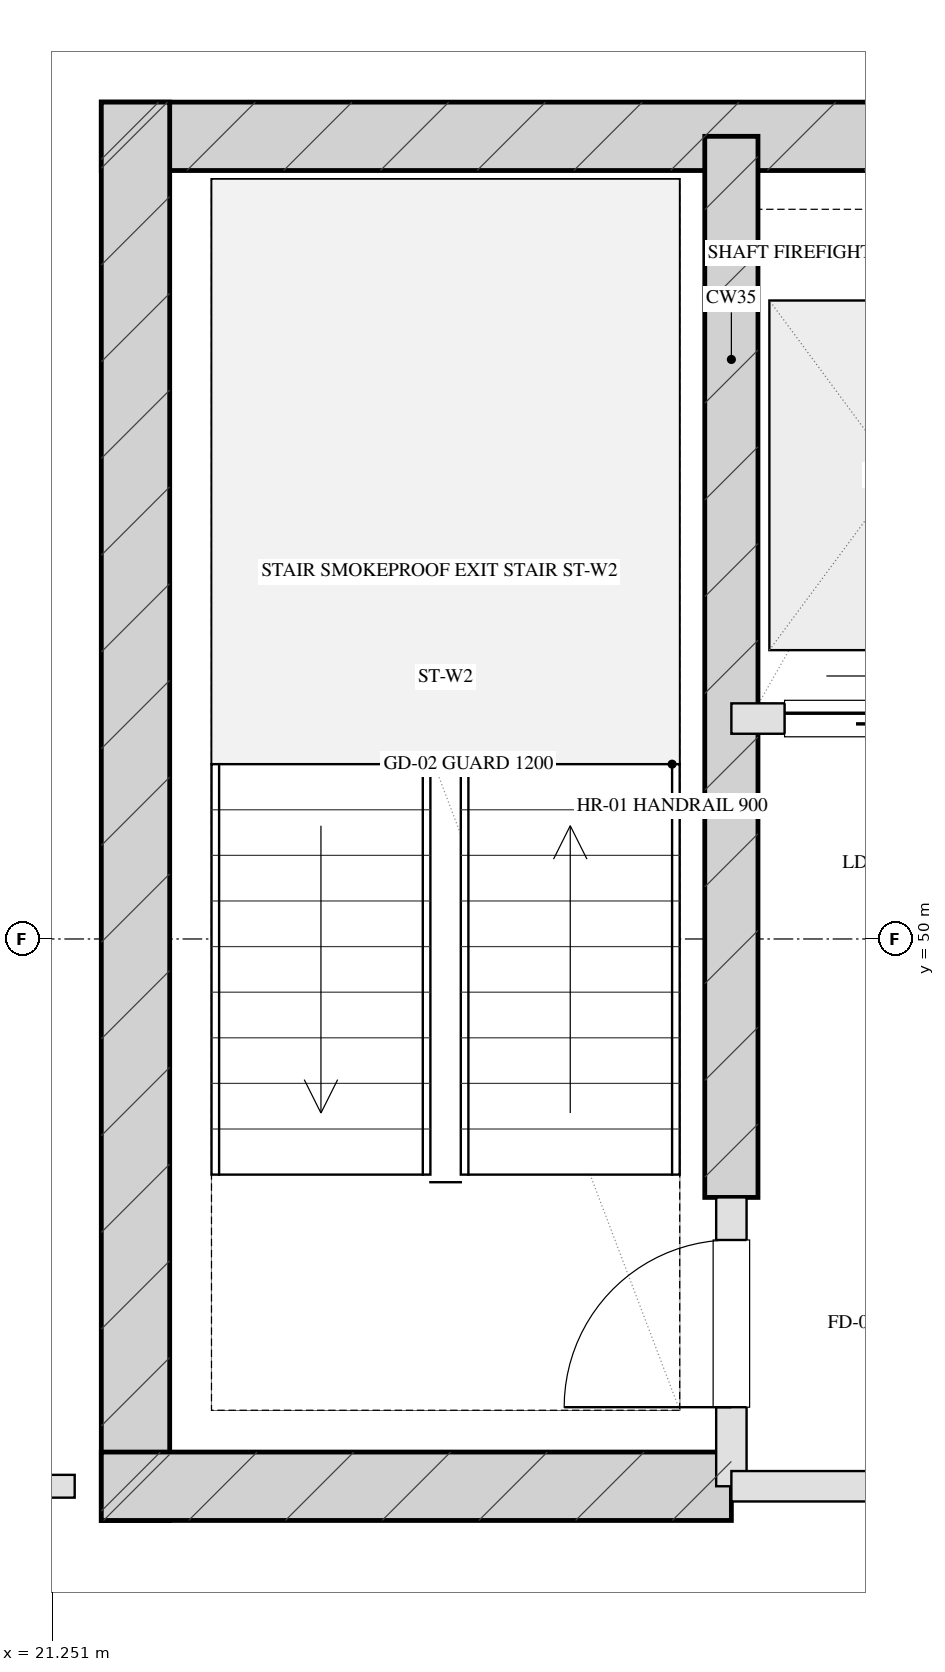
"""IFC4 building model, lengths in metres.
Left out: names, types, materials, properties, quantities, classifications, styles, units other than length and angle.
Written with IfcOpenShell. Run it as: python <this file> out.ifc"""

import sys

from ifc_helpers import new_model, si_unit, direction, frame, frame_2d, origin, place, context, subcontext, project, spatial, rectangle, extrude, element, fill, save


model = new_model("IFC4")
c1 = context("Model", 3, precision=1e-05, world=origin(), true_north=direction((0.0, 1.0)))
c2 = subcontext(c1, "Body", "Model", "MODEL_VIEW")
j1 = project(units=[si_unit("LENGTHUNIT", "METRE"), si_unit("PLANEANGLEUNIT", "RADIAN")], contexts=[c1])
p1 = place(None, origin())
s1 = spatial("IfcSite", under=j1, at=p1, CompositionType="ELEMENT")
p2 = place(p1, origin())
s2 = spatial("IfcBuilding", under=s1, at=p2, CompositionType="ELEMENT")
p3 = place(p2, frame((0.0, 0.0, 216.2)))
s3 = spatial("IfcBuildingStorey", under=s2, at=p3, CompositionType="ELEMENT", Elevation=216.2)
p4 = place(p3, frame((21.575, 55.28, 0.0), z_axis=(0.0, 0.0, 1.0), x_axis=(1.0, 0.0, 0.0)))
e1 = element("IfcWall", 1, at=p4, inside=s3, PredefinedType="SHEAR", context=c2, shape_type="SweptSolid", body=[
    extrude(rectangle(XDim=16.85, YDim=0.45, at=frame_2d((8.425, 0.0))), origin(), (0.0, 0.0, 1.0), 3.45),
])
p5 = place(p3, frame((21.8, 46.175, 0.0), z_axis=(0.0, 0.0, 1.0), x_axis=(0.0, 1.0, 0.0)))
e2 = element("IfcWall", 2, at=p5, inside=s3, PredefinedType="SHEAR", context=c2, shape_type="SweptSolid", body=[
    extrude(rectangle(XDim=9.33, YDim=0.45, at=frame_2d((4.665, 0.0))), origin(), (0.0, 0.0, 1.0), 3.45),
])
p6 = place(p3, frame((25.72, 48.3, 0.0), z_axis=(0.0, 0.0, 1.0), x_axis=(0.0, 1.0, 0.0)))
e3 = element("IfcWall", 3, at=p6, inside=s3, PredefinedType="SHEAR", context=c2, shape_type="SweptSolid", body=[
    extrude(rectangle(XDim=6.98, YDim=0.35, at=frame_2d((3.49, 0.0))), origin(), (0.0, 0.0, 1.0), 3.45),
])
p7 = place(p3, frame((21.575, 46.4, 0.0), z_axis=(0.0, 0.0, 1.0), x_axis=(1.0, 0.0, 0.0)))
e4 = element("IfcWall", 4, at=p7, inside=s3, PredefinedType="SHEAR", context=c2, shape_type="SweptSolid", body=[
    extrude(rectangle(XDim=4.145, YDim=0.45, at=frame_2d((2.073, 0.0))), origin(), (0.0, 0.0, 1.0), 3.45),
])
p8 = place(p3, frame((25.72, 46.4, 0.0), z_axis=(0.0, 0.0, 1.0), x_axis=(0.0, 1.0, 0.0)))
e5 = element("IfcWall", 5, at=p8, inside=s3, PredefinedType="PARTITIONING", context=c2, shape_type="SweptSolid", body=[
    extrude(rectangle(XDim=1.9, YDim=0.2, at=frame_2d((0.95, 0.0))), origin(), (0.0, 0.0, 1.0), 3.155),
])
p9 = place(p8, frame((0.52, 0.0, 0.0)))
e6 = element("IfcOpeningElement", 6, at=p9, cuts=e5, PredefinedType="OPENING", context=c2, shape_type="SweptSolid", body=[
    extrude(rectangle(XDim=1.1, YDim=2.05, at=frame_2d((0.55, 1.025))), frame((0.0, 0.11, 0.0), z_axis=(0.0, -1.0, 0.0), x_axis=(1.0, 0.0, 0.0)), (0.0, 0.0, 1.0), 0.22),
])
p10 = place(p3, frame((25.72, 46.4, 0.0), z_axis=(0.0, 0.0, 1.0), x_axis=(1.0, 0.0, 0.0)))
e7 = element("IfcWall", 7, at=p10, inside=s3, PredefinedType="PARTITIONING", context=c2, shape_type="SweptSolid", body=[
    extrude(rectangle(XDim=3.83, YDim=0.2, at=frame_2d((1.915, 0.0))), origin(), (0.0, 0.0, 1.0), 3.155),
])
p11 = place(p10, frame((1.35, 0.0, 0.0)))
e8 = element("IfcOpeningElement", 8, at=p11, cuts=e7, PredefinedType="OPENING", context=c2, shape_type="SweptSolid", body=[
    extrude(rectangle(XDim=1.2, YDim=2.05, at=frame_2d((0.6, 1.025))), frame((0.0, 0.11, 0.0), z_axis=(0.0, -1.0, 0.0), x_axis=(1.0, 0.0, 0.0)), (0.0, 0.0, 1.0), 0.22),
])
p12 = place(p3, frame((25.72, 51.45, 0.0), z_axis=(0.0, 0.0, 1.0), x_axis=(1.0, 0.0, 0.0)))
e9 = element("IfcWall", 9, at=p12, inside=s3, PredefinedType="PARTITIONING", context=c2, shape_type="SweptSolid", body=[
    extrude(rectangle(XDim=2.1, YDim=0.2, at=frame_2d((1.05, 0.0))), origin(), (0.0, 0.0, 1.0), 3.155),
])
p13 = place(p12, frame((0.35, 0.0, 0.0)))
e10 = element("IfcOpeningElement", 10, at=p13, cuts=e9, PredefinedType="OPENING", context=c2, shape_type="SweptSolid", body=[
    extrude(rectangle(XDim=1.1, YDim=2.05, at=frame_2d((0.55, 1.025))), frame((0.0, 0.11, 0.0), z_axis=(0.0, -1.0, 0.0), x_axis=(1.0, 0.0, 0.0)), (0.0, 0.0, 1.0), 0.22),
])
p14 = place(p3, frame((13.2, 46.4, 0.0), z_axis=(0.0, 0.0, 1.0), x_axis=(1.0, 0.0, 0.0)))
e11 = element("IfcWall", 11, at=p14, inside=s3, PredefinedType="PARTITIONING", context=c2, shape_type="SweptSolid", body=[
    extrude(rectangle(XDim=8.2, YDim=0.15, at=frame_2d((4.1, 0.0))), origin(), (0.0, 0.0, 1.0), 3.155),
])
p15 = place(p14, frame((3.444, 0.0, 0.0)))
e12 = element("IfcOpeningElement", 12, at=p15, cuts=e11, PredefinedType="OPENING", context=c2, shape_type="SweptSolid", body=[
    extrude(rectangle(XDim=1.0, YDim=2.05, at=frame_2d((0.5, 1.025))), frame((0.0, 0.085, 0.0), z_axis=(0.0, -1.0, 0.0), x_axis=(1.0, 0.0, 0.0)), (0.0, 0.0, 1.0), 0.17),
])
p16 = place(p9, origin())
e13 = element("IfcDoor", 13, at=p16, inside=s3, OperationType="SINGLE_SWING_LEFT", PredefinedType="DOOR", context=c2, shape_type="SweptSolid", body=[
    extrude(rectangle(XDim=1.1, YDim=2.05, at=frame_2d((0.55, 1.025))), frame((0.0, 0.025, 0.0), z_axis=(0.0, -1.0, 0.0), x_axis=(1.0, 0.0, 0.0)), (0.0, 0.0, 1.0), 0.05),
])
fill(e6, e13)
p17 = place(p13, origin())
e14 = element("IfcDoor", 14, at=p17, inside=s3, OperationType="DOUBLE_DOOR_SLIDING", PredefinedType="DOOR", context=c2, shape_type="SweptSolid", body=[
    extrude(rectangle(XDim=1.1, YDim=2.05, at=frame_2d((0.55, 1.025))), frame((0.0, 0.025, 0.0), z_axis=(0.0, -1.0, 0.0), x_axis=(1.0, 0.0, 0.0)), (0.0, 0.0, 1.0), 0.05),
])
fill(e10, e14)
save(model, sys.argv[1])
